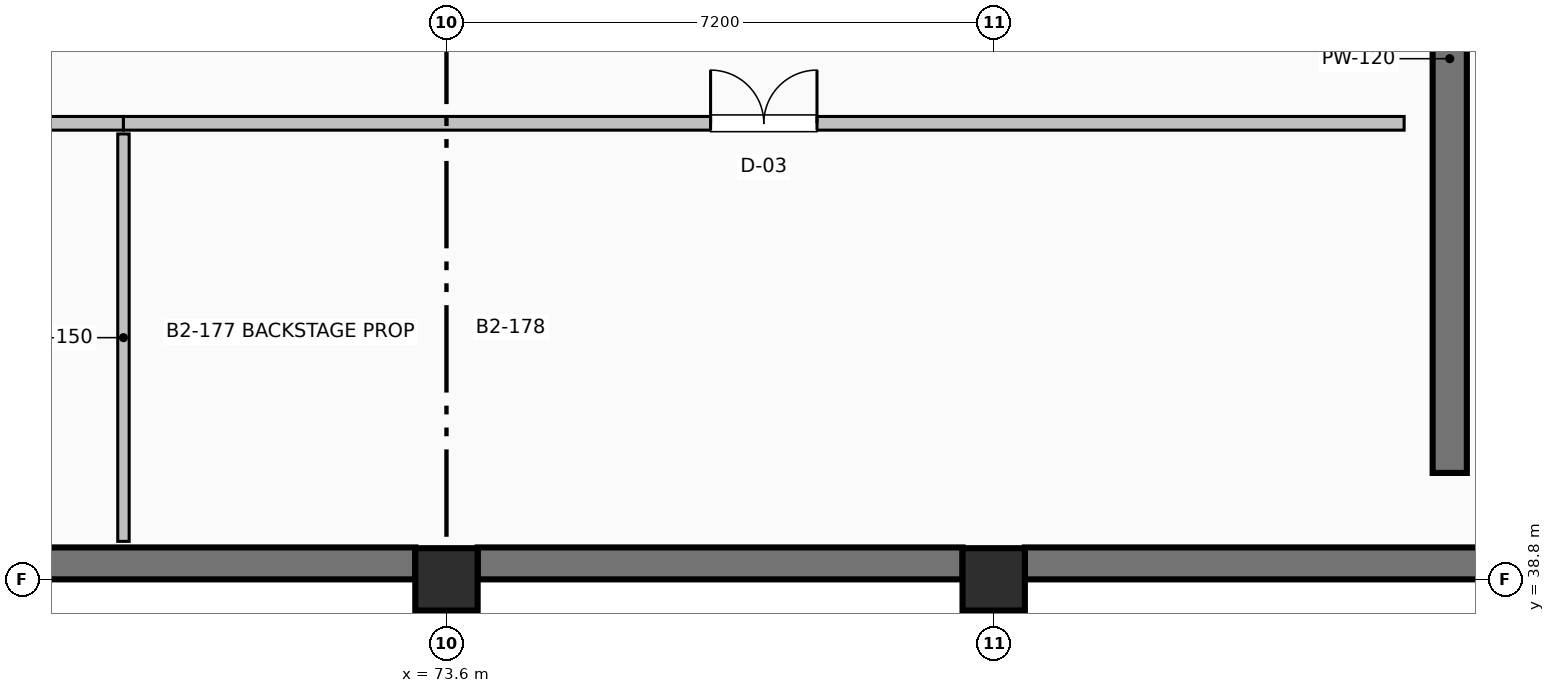
"""IFC4 building model, lengths in metres.
Left out: names, types, materials, properties, quantities, classifications, styles, units other than length and angle.
Written with IfcOpenShell. Run it as: python <this file> out.ifc"""

import sys

from ifc_helpers import new_model, si_unit, direction, frame, frame_2d, origin, origin_2d, place, context, subcontext, project, spatial, rectangle, extrude, element, fill, save


model = new_model("IFC4")
c1 = context("Model", 3, precision=1e-05, world=origin(), true_north=direction((0.0, 1.0)))
c2 = subcontext(c1, "Body", "Model", "MODEL_VIEW")
j1 = project(units=[si_unit("LENGTHUNIT", "METRE"), si_unit("PLANEANGLEUNIT", "RADIAN")], contexts=[c1])
p1 = place(None, origin())
s1 = spatial("IfcSite", under=j1, at=p1, CompositionType="ELEMENT")
p2 = place(p1, origin())
s2 = spatial("IfcBuilding", under=s1, at=p2, CompositionType="ELEMENT")
p3 = place(p2, frame((0.0, 0.0, -9.6)))
s3 = spatial("IfcBuildingStorey", under=s2, at=p3, CompositionType="ELEMENT", Elevation=-9.6)
for number, where, z_axis, x_axis in (
    (1, (73.6, 38.8, 0.0), (0.0, 0.0, 1.0), (1.0, 0.0, 0.0)),
    (2, (80.8, 38.8, 0.0), (0.0, 0.0, 1.0), (1.0, 0.0, 0.0)),
):
    element("IfcColumn", number, at=place(p3, frame(where, z_axis=z_axis, x_axis=x_axis)), inside=s3, PredefinedType="COLUMN", context=c2, shape_type="SweptSolid", body=[
        extrude(rectangle(XDim=0.82, YDim=0.82, at=origin_2d()), origin(), (0.0, 0.0, 1.0), 4.8),
    ])
p4 = place(p3, frame((86.8, 40.2, 0.0), z_axis=(0.0, 0.0, 1.0), x_axis=(0.0, 1.0, 0.0)))
e3 = element("IfcWall", 3, at=p4, inside=s3, PredefinedType="SHEAR", context=c2, shape_type="SweptSolid", body=[
    extrude(rectangle(XDim=14.0, YDim=0.45, at=frame_2d((7.0, 0.0))), origin(), (0.0, 0.0, 1.0), 4.48),
])
p5 = place(p3, frame((87.59, 39.01, 0.0), z_axis=(0.0, 0.0, 1.0), x_axis=(-1.0, 0.0, 0.0)))
e4 = element("IfcWall", 4, at=p5, inside=s3, PredefinedType="SHEAR", context=c2, shape_type="SweptSolid", body=[
    extrude(rectangle(XDim=6.38, YDim=0.42, at=frame_2d((3.19, 0.0))), origin(), (0.0, 0.0, 1.0), 4.5),
])
for number, where, z_axis, x_axis in (
    (5, (80.39, 39.01, 0.0), (0.0, 0.0, 1.0), (-1.0, 0.0, 0.0)),
    (6, (73.19, 39.01, 0.0), (0.0, 0.0, 1.0), (-1.0, 0.0, 0.0)),
):
    element("IfcWall", number, at=place(p3, frame(where, z_axis=z_axis, x_axis=x_axis)), inside=s3, PredefinedType="SHEAR", context=c2, shape_type="SweptSolid", body=[
        extrude(rectangle(XDim=6.38, YDim=0.42, at=frame_2d((3.19, 0.0))), origin(), (0.0, 0.0, 1.0), 4.5),
    ])
p6 = place(p3, frame((52.5, 44.8, 0.0), z_axis=(0.0, 0.0, 1.0), x_axis=(1.0, 0.0, 0.0)))
e7 = element("IfcWall", 7, at=p6, inside=s3, PredefinedType="PARTITIONING", context=c2, shape_type="SweptSolid", body=[
    extrude(rectangle(XDim=16.85, YDim=0.18, at=frame_2d((8.425, 0.0))), origin(), (0.0, 0.0, 1.0), 4.492),
])
p7 = place(p6, frame((7.565, 0.0, 0.0)))
e8 = element("IfcOpeningElement", 8, at=p7, cuts=e7, PredefinedType="OPENING", context=c2, shape_type="SweptSolid", body=[
    extrude(rectangle(XDim=1.72, YDim=2.22, at=frame_2d((0.86, 1.11))), frame((0.0, 0.1, 0.0), z_axis=(0.0, -1.0, 0.0), x_axis=(1.0, 0.0, 0.0)), (0.0, 0.0, 1.0), 0.2),
])
p8 = place(p3, frame((69.35, 39.3, 0.0), z_axis=(0.0, 0.0, 1.0), x_axis=(0.0, 1.0, 0.0)))
e9 = element("IfcWall", 9, at=p8, inside=s3, PredefinedType="PARTITIONING", context=c2, shape_type="SweptSolid", body=[
    extrude(rectangle(XDim=5.36, YDim=0.15, at=frame_2d((2.68, 0.0))), origin(), (0.0, 0.0, 1.0), 4.492),
])
p9 = place(p3, frame((69.35, 44.8, 0.0), z_axis=(0.0, 0.0, 1.0), x_axis=(1.0, 0.0, 0.0)))
e10 = element("IfcWall", 10, at=p9, inside=s3, PredefinedType="PARTITIONING", context=c2, shape_type="SweptSolid", body=[
    extrude(rectangle(XDim=16.85, YDim=0.18, at=frame_2d((8.425, 0.0))), origin(), (0.0, 0.0, 1.0), 4.492),
])
p10 = place(p9, frame((7.725, 0.0, 0.0)))
e11 = element("IfcOpeningElement", 11, at=p10, cuts=e10, PredefinedType="OPENING", context=c2, shape_type="SweptSolid", body=[
    extrude(rectangle(XDim=1.4, YDim=2.12, at=frame_2d((0.7, 1.06))), frame((0.0, 0.1, 0.0), z_axis=(0.0, -1.0, 0.0), x_axis=(1.0, 0.0, 0.0)), (0.0, 0.0, 1.0), 0.2),
])
p11 = place(p10, origin())
e12 = element("IfcDoor", 12, at=p11, inside=s3, OperationType="DOUBLE_DOOR_SINGLE_SWING", PredefinedType="DOOR", context=c2, shape_type="SweptSolid", body=[
    extrude(rectangle(XDim=1.4, YDim=2.12, at=frame_2d((0.7, 1.06))), frame((0.0, 0.025, 0.0), z_axis=(0.0, -1.0, 0.0), x_axis=(1.0, 0.0, 0.0)), (0.0, 0.0, 1.0), 0.05),
])
fill(e11, e12)
save(model, sys.argv[1])
